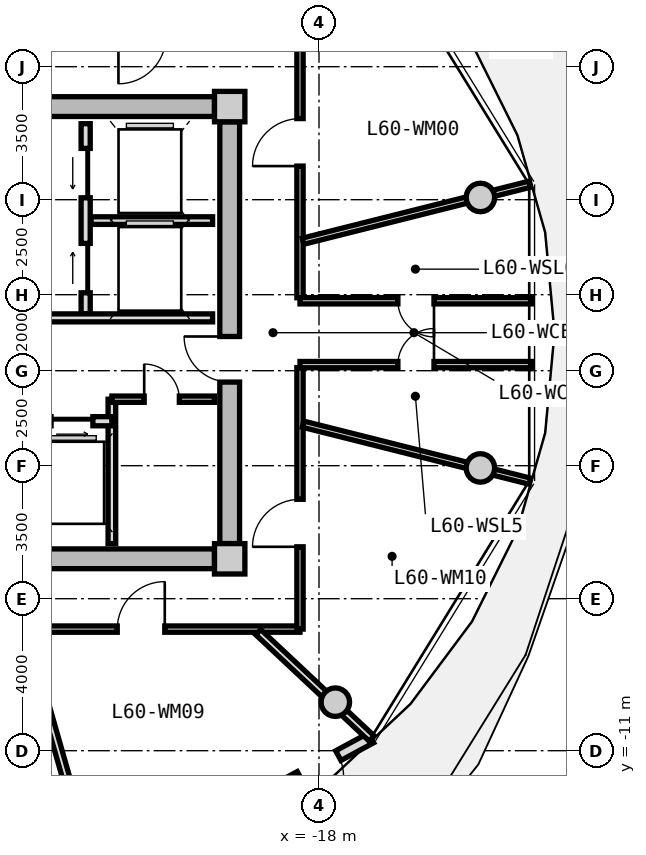
"""IFC4 building model, lengths in metres.
Left out: names, types, materials, properties, quantities, classifications, styles, units other than length and angle.
Written with IfcOpenShell. Run it as: python <this file> out.ifc"""

import sys

from ifc_helpers import new_model, si_unit, direction, frame, frame_2d, origin, origin_2d, place, context, subcontext, project, spatial, rectangle, circle, extrude, source, transform, mapped, element, fill, save


model = new_model("IFC4")
c1 = context("Model", 3, precision=1e-05, world=origin(), true_north=direction((0.0, 1.0)))
c2 = subcontext(c1, "Body", "Model", "MODEL_VIEW")
j1 = project(units=[si_unit("LENGTHUNIT", "METRE"), si_unit("PLANEANGLEUNIT", "RADIAN")], contexts=[c1])
p1 = place(None, origin())
s1 = spatial("IfcSite", under=j1, at=p1, CompositionType="ELEMENT")
p2 = place(p1, origin())
s2 = spatial("IfcBuilding", under=s1, at=p2, CompositionType="ELEMENT")
p3 = place(p2, frame((0.0, 0.0, 193.7)))
s3 = spatial("IfcBuildingStorey", under=s2, at=p3, CompositionType="ELEMENT", Elevation=193.7)
m1 = source(origin(), c2, "Body", "SweptSolid", [
    extrude(rectangle(XDim=0.8, YDim=0.8, at=origin_2d()), origin(), (0.0, 0.0, 1.0), 3.05),
])
for number, where, z_axis, x_axis in (
    (1, (-20.35, -5.95, 0.0), (0.0, 0.0, 1.0), (1.0, 0.0, 0.0)),
    (2, (-20.35, 5.95, 0.0), (0.0, 0.0, 1.0), (1.0, 0.0, 0.0)),
):
    element("IfcColumn", number, at=place(p3, frame(where, z_axis=z_axis, x_axis=x_axis)), inside=s3, PredefinedType="COLUMN", context=c2, shape_type="MappedRepresentation", body=[
        mapped(m1, transform((0.0, 0.0, 0.0), x_axis=(1.0, 0.0, 0.0), y_axis=(0.0, 1.0, 0.0), z_axis=(0.0, 0.0, 1.0), scale=1.0)),
    ])
m2 = source(origin(), c2, "Body", "SweptSolid", [
    extrude(rectangle(XDim=14.5, YDim=0.52, at=frame_2d((7.25, 0.0))), origin(), (0.0, 0.0, 1.0), 2.81),
])
for number, where, z_axis, x_axis in (
    (3, (-35.25, 5.95, 0.0), (0.0, 0.0, 1.0), (1.0, 0.0, 0.0)),
    (4, (-20.75, -5.95, 0.0), (0.0, 0.0, 1.0), (-1.0, 0.0, 0.0)),
):
    element("IfcWall", number, at=place(p3, frame(where, z_axis=z_axis, x_axis=x_axis)), inside=s3, PredefinedType="SHEAR", context=c2, shape_type="MappedRepresentation", body=[
        mapped(m2, transform((0.0, 0.0, 0.0), x_axis=(1.0, 0.0, 0.0), y_axis=(0.0, 1.0, 0.0), z_axis=(0.0, 0.0, 1.0), scale=1.0)),
    ])
m3 = source(origin(), c2, "Body", "SweptSolid", [
    extrude(rectangle(XDim=11.1, YDim=0.52, at=frame_2d((5.55, 0.0))), origin(), (0.0, 0.0, 1.0), 2.81),
])
p4 = place(p3, frame((-20.35, 5.55, 0.0), z_axis=(0.0, 0.0, 1.0), x_axis=(0.0, -1.0, 0.0)))
e5 = element("IfcWall", 5, at=p4, inside=s3, PredefinedType="SHEAR", context=c2, shape_type="MappedRepresentation", body=[
    mapped(m3, transform((0.0, 0.0, 0.0), x_axis=(1.0, 0.0, 0.0), y_axis=(0.0, 1.0, 0.0), z_axis=(0.0, 0.0, 1.0), scale=1.0)),
])
p5 = place(p4, frame((5.65, 0.0, 0.0)))
e6 = element("IfcOpeningElement", 6, at=p5, cuts=e5, PredefinedType="OPENING", context=c2, shape_type="SweptSolid", body=[
    extrude(rectangle(XDim=1.2, YDim=2.15, at=frame_2d((0.6, 1.075))), frame((0.0, 0.27, 0.0), z_axis=(0.0, -1.0, 0.0), x_axis=(1.0, 0.0, 0.0)), (0.0, 0.0, 1.0), 0.54),
])
m4 = source(origin(), c2, "Body", "SweptSolid", [
    extrude(circle(Radius=0.375, at=origin_2d()), origin(), (0.0, 0.0, 1.0), 3.05),
])
for number, where, z_axis, x_axis in (
    (7, (-13.753, 3.559, 0.0), (0.0, 0.0, 1.0), (1.0, 0.0, 0.0)),
    (8, (-17.57, -9.723, 0.0), (0.0, 0.0, 1.0), (1.0, 0.0, 0.0)),
    (9, (-13.753, -3.559, 0.0), (0.0, 0.0, 1.0), (1.0, 0.0, 0.0)),
):
    element("IfcColumn", number, at=place(p3, frame(where, z_axis=z_axis, x_axis=x_axis)), inside=s3, PredefinedType="COLUMN", context=c2, shape_type="MappedRepresentation", body=[
        mapped(m4, transform((0.0, 0.0, 0.0), x_axis=(1.0, 0.0, 0.0), y_axis=(0.0, 1.0, 0.0), z_axis=(0.0, 0.0, 1.0), scale=1.0)),
    ])
m5 = source(origin(), c2, "Body", "SweptSolid", [
    extrude(rectangle(XDim=8.197, YDim=0.29, at=frame_2d((4.099, 0.0))), origin(), (0.0, 0.0, 1.0), 2.81),
])
p6 = place(p3, frame((-16.63, -10.663, 0.0), z_axis=(0.0, 0.0, 1.0), x_axis=(-0.879369910001, -0.476139224791, 0.0)))
e10 = element("IfcWall", 10, at=p6, inside=s3, PredefinedType="SOLIDWALL", context=c2, shape_type="MappedRepresentation", body=[
    mapped(m5, transform((0.0, 0.0, 0.0), x_axis=(1.0, 0.0, 0.0), y_axis=(0.0, 1.0, 0.0), z_axis=(0.0, 0.0, 1.0), scale=1.0)),
])
p7 = place(p6, frame((0.98, 0.0, 0.0)))
e11 = element("IfcOpeningElement", 11, at=p7, cuts=e10, PredefinedType="OPENING", context=c2, shape_type="SweptSolid", body=[
    extrude(rectangle(XDim=1.15, YDim=2.25, at=frame_2d((0.575, 1.125))), frame((0.0, 0.155, 0.0), z_axis=(0.0, -1.0, 0.0), x_axis=(1.0, 0.0, 0.0)), (0.0, 0.0, 1.0), 0.31),
])
p8 = place(p6, frame((4.448, 0.0, 0.85)))
e12 = element("IfcOpeningElement", 12, at=p8, cuts=e10, PredefinedType="OPENING", context=c2, shape_type="SweptSolid", body=[
    extrude(rectangle(XDim=1.2, YDim=1.5, at=frame_2d((0.6, 0.75))), frame((0.0, 0.155, 0.0), z_axis=(0.0, -1.0, 0.0), x_axis=(1.0, 0.0, 0.0)), (0.0, 0.0, 1.0), 0.31),
])
m6 = source(origin(), c2, "Body", "SweptSolid", [
    extrude(rectangle(XDim=5.0, YDim=0.24, at=frame_2d((2.5, 0.0))), origin(), (0.0, 0.0, 1.0), 2.795),
])
p9 = place(p3, frame((-24.14, 0.5, 0.0), z_axis=(0.0, 0.0, 1.0), x_axis=(0.0, 1.0, 0.0)))
e13 = element("IfcWall", 13, at=p9, inside=s3, PredefinedType="PARTITIONING", context=c2, shape_type="MappedRepresentation", body=[
    mapped(m6, transform((0.0, 0.0, 0.0), x_axis=(1.0, 0.0, 0.0), y_axis=(0.0, 1.0, 0.0), z_axis=(0.0, 0.0, 1.0), scale=1.0)),
])
p10 = place(p9, frame((3.05, 0.0, 0.0)))
e14 = element("IfcOpeningElement", 14, at=p10, cuts=e13, PredefinedType="OPENING", context=c2, shape_type="SweptSolid", body=[
    extrude(rectangle(XDim=1.3, YDim=2.2, at=frame_2d((0.65, 1.1))), frame((0.0, 0.13, 0.0), z_axis=(0.0, -1.0, 0.0), x_axis=(1.0, 0.0, 0.0)), (0.0, 0.0, 1.0), 0.26),
])
p11 = place(p9, frame((0.55, 0.0, 0.0)))
e15 = element("IfcOpeningElement", 15, at=p11, cuts=e13, PredefinedType="OPENING", context=c2, shape_type="SweptSolid", body=[
    extrude(rectangle(XDim=1.3, YDim=2.2, at=frame_2d((0.65, 1.1))), frame((0.0, 0.13, 0.0), z_axis=(0.0, -1.0, 0.0), x_axis=(1.0, 0.0, 0.0)), (0.0, 0.0, 1.0), 0.26),
])
m7 = source(origin(), c2, "Body", "SweptSolid", [
    extrude(rectangle(XDim=3.2, YDim=0.2, at=frame_2d((1.6, 0.0))), origin(), (0.0, 0.0, 1.0), 2.795),
])
p12 = place(p3, frame((-24.0, 2.95, 0.0), z_axis=(0.0, 0.0, 1.0), x_axis=(1.0, 0.0, 0.0)))
e16 = element("IfcWall", 16, at=p12, inside=s3, PredefinedType="PARTITIONING", context=c2, shape_type="MappedRepresentation", body=[
    mapped(m7, transform((0.0, 0.0, 0.0), x_axis=(1.0, 0.0, 0.0), y_axis=(0.0, 1.0, 0.0), z_axis=(0.0, 0.0, 1.0), scale=1.0)),
])
m8 = source(origin(), c2, "Body", "SweptSolid", [
    extrude(rectangle(XDim=6.66, YDim=0.21, at=frame_2d((3.33, 0.0))), origin(), (0.0, 0.0, 1.0), 2.795),
])
p13 = place(p3, frame((-27.46, 0.39, 0.0), z_axis=(0.0, 0.0, 1.0), x_axis=(1.0, 0.0, 0.0)))
e17 = element("IfcWall", 17, at=p13, inside=s3, PredefinedType="PARTITIONING", context=c2, shape_type="MappedRepresentation", body=[
    mapped(m8, transform((0.0, 0.0, 0.0), x_axis=(1.0, 0.0, 0.0), y_axis=(0.0, 1.0, 0.0), z_axis=(0.0, 0.0, 1.0), scale=1.0)),
])
p14 = place(p13, frame((1.0, 0.0, 0.0)))
e18 = element("IfcOpeningElement", 18, at=p14, cuts=e17, PredefinedType="OPENING", context=c2, shape_type="SweptSolid", body=[
    extrude(rectangle(XDim=1.2, YDim=2.15, at=frame_2d((0.6, 1.075))), frame((0.0, 0.115, 0.0), z_axis=(0.0, -1.0, 0.0), x_axis=(1.0, 0.0, 0.0)), (0.0, 0.0, 1.0), 0.23),
])
m9 = source(origin(), c2, "Body", "SweptSolid", [
    extrude(rectangle(XDim=3.8, YDim=0.2, at=frame_2d((1.9, 0.0))), origin(), (0.0, 0.0, 1.0), 2.795),
])
p15 = place(p3, frame((-23.45, -5.55, 0.0), z_axis=(0.0, 0.0, 1.0), x_axis=(0.0, 1.0, 0.0)))
e19 = element("IfcWall", 19, at=p15, inside=s3, PredefinedType="PARTITIONING", context=c2, shape_type="MappedRepresentation", body=[
    mapped(m9, transform((0.0, 0.0, 0.0), x_axis=(1.0, 0.0, 0.0), y_axis=(0.0, 1.0, 0.0), z_axis=(0.0, 0.0, 1.0), scale=1.0)),
])
m10 = source(origin(), c2, "Body", "SweptSolid", [
    extrude(rectangle(XDim=2.05, YDim=0.24, at=frame_2d((1.025, 0.0))), origin(), (0.0, 0.0, 1.0), 2.795),
])
p16 = place(p3, frame((-25.5, -2.33, 0.0), z_axis=(0.0, 0.0, 1.0), x_axis=(1.0, 0.0, 0.0)))
e20 = element("IfcWall", 20, at=p16, inside=s3, PredefinedType="PARTITIONING", context=c2, shape_type="MappedRepresentation", body=[
    mapped(m10, transform((0.0, 0.0, 0.0), x_axis=(1.0, 0.0, 0.0), y_axis=(0.0, 1.0, 0.0), z_axis=(0.0, 0.0, 1.0), scale=1.0)),
])
p17 = place(p16, frame((0.45, 0.0, 0.0)))
e21 = element("IfcOpeningElement", 21, at=p17, cuts=e20, PredefinedType="OPENING", context=c2, shape_type="SweptSolid", body=[
    extrude(rectangle(XDim=1.1, YDim=2.2, at=frame_2d((0.55, 1.1))), frame((0.0, 0.13, 0.0), z_axis=(0.0, -1.0, 0.0), x_axis=(1.0, 0.0, 0.0)), (0.0, 0.0, 1.0), 0.26),
])
m11 = source(origin(), c2, "Body", "SweptSolid", [
    extrude(rectangle(XDim=2.7, YDim=0.165, at=frame_2d((1.35, 0.0))), origin(), (0.0, 0.0, 1.0), 2.795),
])
p18 = place(p3, frame((-23.45, -1.75, 0.0), z_axis=(0.0, 0.0, 1.0), x_axis=(1.0, 0.0, 0.0)))
e22 = element("IfcWall", 22, at=p18, inside=s3, PredefinedType="PARTITIONING", context=c2, shape_type="MappedRepresentation", body=[
    mapped(m11, transform((0.0, 0.0, 0.0), x_axis=(1.0, 0.0, 0.0), y_axis=(0.0, 1.0, 0.0), z_axis=(0.0, 0.0, 1.0), scale=1.0)),
])
p19 = place(p18, frame((0.85, 0.0, 0.0)))
e23 = element("IfcOpeningElement", 23, at=p19, cuts=e22, PredefinedType="OPENING", context=c2, shape_type="SweptSolid", body=[
    extrude(rectangle(XDim=0.925, YDim=2.1, at=frame_2d((0.462, 1.05))), frame((0.0, 0.093, 0.0), z_axis=(0.0, -1.0, 0.0), x_axis=(1.0, 0.0, 0.0)), (0.0, 0.0, 1.0), 0.185),
])
m12 = source(origin(), c2, "Body", "SweptSolid", [
    extrude(rectangle(XDim=19.0, YDim=0.165, at=frame_2d((9.5, 0.0))), origin(), (0.0, 0.0, 1.0), 2.795),
])
p20 = place(p3, frame((-18.5, -7.8, 0.0), z_axis=(0.0, 0.0, 1.0), x_axis=(-1.0, 0.0, 0.0)))
e24 = element("IfcWall", 24, at=p20, inside=s3, PredefinedType="PARTITIONING", context=c2, shape_type="MappedRepresentation", body=[
    mapped(m12, transform((0.0, 0.0, 0.0), x_axis=(1.0, 0.0, 0.0), y_axis=(0.0, 1.0, 0.0), z_axis=(0.0, 0.0, 1.0), scale=1.0)),
])
p21 = place(p20, frame((12.569, 0.0, 0.0)))
e25 = element("IfcOpeningElement", 25, at=p21, cuts=e24, PredefinedType="OPENING", context=c2, shape_type="SweptSolid", body=[
    extrude(rectangle(XDim=1.25, YDim=2.2, at=frame_2d((0.625, 1.1))), frame((0.0, 0.093, 0.0), z_axis=(0.0, -1.0, 0.0), x_axis=(1.0, 0.0, 0.0)), (0.0, 0.0, 1.0), 0.185),
])
p22 = place(p20, frame((7.868, 0.0, 0.0)))
e26 = element("IfcOpeningElement", 26, at=p22, cuts=e24, PredefinedType="OPENING", context=c2, shape_type="SweptSolid", body=[
    extrude(rectangle(XDim=1.25, YDim=2.2, at=frame_2d((0.625, 1.1))), frame((0.0, 0.093, 0.0), z_axis=(0.0, -1.0, 0.0), x_axis=(1.0, 0.0, 0.0)), (0.0, 0.0, 1.0), 0.185),
])
p23 = place(p20, frame((3.559, 0.0, 0.0)))
e27 = element("IfcOpeningElement", 27, at=p23, cuts=e24, PredefinedType="OPENING", context=c2, shape_type="SweptSolid", body=[
    extrude(rectangle(XDim=1.25, YDim=2.2, at=frame_2d((0.625, 1.1))), frame((0.0, 0.093, 0.0), z_axis=(0.0, -1.0, 0.0), x_axis=(1.0, 0.0, 0.0)), (0.0, 0.0, 1.0), 0.185),
])
m13 = source(origin(), c2, "Body", "SweptSolid", [
    extrude(rectangle(XDim=6.88, YDim=0.165, at=frame_2d((3.44, 0.0))), origin(), (0.0, 0.0, 1.0), 2.795),
])
p24 = place(p3, frame((-18.5, 7.8, 0.0), z_axis=(0.0, 0.0, 1.0), x_axis=(0.0, -1.0, 0.0)))
e28 = element("IfcWall", 28, at=p24, inside=s3, PredefinedType="PARTITIONING", context=c2, shape_type="MappedRepresentation", body=[
    mapped(m13, transform((0.0, 0.0, 0.0), x_axis=(1.0, 0.0, 0.0), y_axis=(0.0, 1.0, 0.0), z_axis=(0.0, 0.0, 1.0), scale=1.0)),
])
p25 = place(p24, frame((2.166, 0.0, 0.0)))
e29 = element("IfcOpeningElement", 29, at=p25, cuts=e28, PredefinedType="OPENING", context=c2, shape_type="SweptSolid", body=[
    extrude(rectangle(XDim=1.25, YDim=2.2, at=frame_2d((0.625, 1.1))), frame((0.0, 0.093, 0.0), z_axis=(0.0, -1.0, 0.0), x_axis=(1.0, 0.0, 0.0)), (0.0, 0.0, 1.0), 0.185),
])
p26 = place(p3, frame((-18.5, -0.92, 0.0), z_axis=(0.0, 0.0, 1.0), x_axis=(0.0, -1.0, 0.0)))
e30 = element("IfcWall", 30, at=p26, inside=s3, PredefinedType="PARTITIONING", context=c2, shape_type="MappedRepresentation", body=[
    mapped(m13, transform((0.0, 0.0, 0.0), x_axis=(1.0, 0.0, 0.0), y_axis=(0.0, 1.0, 0.0), z_axis=(0.0, 0.0, 1.0), scale=1.0)),
])
p27 = place(p26, frame((3.464, 0.0, 0.0)))
e31 = element("IfcOpeningElement", 31, at=p27, cuts=e30, PredefinedType="OPENING", context=c2, shape_type="SweptSolid", body=[
    extrude(rectangle(XDim=1.25, YDim=2.2, at=frame_2d((0.625, 1.1))), frame((0.0, 0.093, 0.0), z_axis=(0.0, -1.0, 0.0), x_axis=(1.0, 0.0, 0.0)), (0.0, 0.0, 1.0), 0.185),
])
m14 = source(origin(), c2, "Body", "SweptSolid", [
    extrude(rectangle(XDim=6.157, YDim=0.165, at=frame_2d((3.079, 0.0))), origin(), (0.0, 0.0, 1.0), 2.435),
])
p28 = place(p3, frame((-18.42, -2.407, 0.0), z_axis=(0.0, 0.0, 1.0), x_axis=(0.969840867184, -0.243738984038, 0.0)))
e32 = element("IfcWall", 32, at=p28, inside=s3, PredefinedType="PARTITIONING", context=c2, shape_type="MappedRepresentation", body=[
    mapped(m14, transform((0.0, 0.0, 0.0), x_axis=(1.0, 0.0, 0.0), y_axis=(0.0, 1.0, 0.0), z_axis=(0.0, 0.0, 1.0), scale=1.0)),
])
m15 = source(origin(), c2, "Body", "SweptSolid", [
    extrude(rectangle(XDim=6.157, YDim=0.165, at=frame_2d((3.079, 0.0))), origin(), (0.0, 0.0, 1.0), 2.395),
])
p29 = place(p3, frame((-18.42, 2.407, 0.0), z_axis=(0.0, 0.0, 1.0), x_axis=(0.969840867184, 0.243738984038, 0.0)))
e33 = element("IfcWall", 33, at=p29, inside=s3, PredefinedType="PARTITIONING", context=c2, shape_type="MappedRepresentation", body=[
    mapped(m15, transform((0.0, 0.0, 0.0), x_axis=(1.0, 0.0, 0.0), y_axis=(0.0, 1.0, 0.0), z_axis=(0.0, 0.0, 1.0), scale=1.0)),
])
m16 = source(origin(), c2, "Body", "SweptSolid", [
    extrude(rectangle(XDim=6.101, YDim=0.165, at=frame_2d((3.051, 0.0))), origin(), (0.0, 0.0, 1.0), 2.795),
])
p30 = place(p3, frame((-18.5, 0.84, 0.0), z_axis=(0.0, 0.0, 1.0), x_axis=(1.0, 0.0, 0.0)))
e34 = element("IfcWall", 34, at=p30, inside=s3, PredefinedType="PARTITIONING", context=c2, shape_type="MappedRepresentation", body=[
    mapped(m16, transform((0.0, 0.0, 0.0), x_axis=(1.0, 0.0, 0.0), y_axis=(0.0, 1.0, 0.0), z_axis=(0.0, 0.0, 1.0), scale=1.0)),
])
p31 = place(p30, frame((2.576, 0.0, 0.0)))
e35 = element("IfcOpeningElement", 35, at=p31, cuts=e34, PredefinedType="OPENING", context=c2, shape_type="SweptSolid", body=[
    extrude(rectangle(XDim=0.95, YDim=2.1, at=frame_2d((0.475, 1.05))), frame((0.0, 0.093, 0.0), z_axis=(0.0, -1.0, 0.0), x_axis=(1.0, 0.0, 0.0)), (0.0, 0.0, 1.0), 0.185),
])
p32 = place(p3, frame((-12.399, -0.84, 0.0), z_axis=(0.0, 0.0, 1.0), x_axis=(-1.0, 0.0, 0.0)))
e36 = element("IfcWall", 36, at=p32, inside=s3, PredefinedType="PARTITIONING", context=c2, shape_type="MappedRepresentation", body=[
    mapped(m16, transform((0.0, 0.0, 0.0), x_axis=(1.0, 0.0, 0.0), y_axis=(0.0, 1.0, 0.0), z_axis=(0.0, 0.0, 1.0), scale=1.0)),
])
p33 = place(p32, frame((2.576, 0.0, 0.0)))
e37 = element("IfcOpeningElement", 37, at=p33, cuts=e36, PredefinedType="OPENING", context=c2, shape_type="SweptSolid", body=[
    extrude(rectangle(XDim=0.95, YDim=2.1, at=frame_2d((0.475, 1.05))), frame((0.0, 0.093, 0.0), z_axis=(0.0, -1.0, 0.0), x_axis=(1.0, 0.0, 0.0)), (0.0, 0.0, 1.0), 0.185),
])
m17 = source(origin(), c2, "Body", "SweptSolid", [
    extrude(rectangle(XDim=6.974, YDim=0.19, at=frame_2d((3.487, 0.0))), origin(), (0.0, 0.0, 1.0), 2.395),
])
p34 = place(p3, frame((-25.749, -7.88, 0.0), z_axis=(0.0, 0.0, 1.0), x_axis=(0.274707256801, -0.961527910703, 0.0)))
e38 = element("IfcWall", 38, at=p34, inside=s3, PredefinedType="PARTITIONING", context=c2, shape_type="MappedRepresentation", body=[
    mapped(m17, transform((0.0, 0.0, 0.0), x_axis=(1.0, 0.0, 0.0), y_axis=(0.0, 1.0, 0.0), z_axis=(0.0, 0.0, 1.0), scale=1.0)),
])
m18 = source(origin(), c2, "Body", "SweptSolid", [
    extrude(rectangle(XDim=4.089, YDim=0.19, at=frame_2d((2.044, 0.0))), origin(), (0.0, 0.0, 1.0), 2.395),
])
p35 = place(p3, frame((-19.598, -7.88, 0.0), z_axis=(0.0, 0.0, 1.0), x_axis=(0.729401273609, -0.684086092577, 0.0)))
e39 = element("IfcWall", 39, at=p35, inside=s3, PredefinedType="PARTITIONING", context=c2, shape_type="MappedRepresentation", body=[
    mapped(m18, transform((0.0, 0.0, 0.0), x_axis=(1.0, 0.0, 0.0), y_axis=(0.0, 1.0, 0.0), z_axis=(0.0, 0.0, 1.0), scale=1.0)),
])
m19 = source(origin(), c2, "Body", "SweptSolid", [
    extrude(rectangle(XDim=1.15, YDim=2.25, at=frame_2d((0.575, 1.125))), frame((0.0, 0.025, 0.0), z_axis=(0.0, -1.0, 0.0), x_axis=(1.0, 0.0, 0.0)), (0.0, 0.0, 1.0), 0.05),
])
p36 = place(p7, origin())
e40 = element("IfcDoor", 40, at=p36, inside=s3, OperationType="SINGLE_SWING_RIGHT", PredefinedType="DOOR", context=c2, shape_type="MappedRepresentation", body=[
    mapped(m19, transform((0.0, 0.0, 0.0), x_axis=(1.0, 0.0, 0.0), y_axis=(0.0, 1.0, 0.0), z_axis=(0.0, 0.0, 1.0), scale=1.0)),
])
fill(e11, e40)
m20 = source(origin(), c2, "Body", "SweptSolid", [
    extrude(rectangle(XDim=1.3, YDim=2.2, at=frame_2d((0.65, 1.1))), frame((0.0, 0.025, 0.0), z_axis=(0.0, -1.0, 0.0), x_axis=(1.0, 0.0, 0.0)), (0.0, 0.0, 1.0), 0.05),
])
p37 = place(p10, origin())
e41 = element("IfcDoor", 41, at=p37, inside=s3, OperationType="SLIDING_TO_LEFT", PredefinedType="DOOR", context=c2, shape_type="MappedRepresentation", body=[
    mapped(m20, transform((0.0, 0.0, 0.0), x_axis=(1.0, 0.0, 0.0), y_axis=(0.0, 1.0, 0.0), z_axis=(0.0, 0.0, 1.0), scale=1.0)),
])
fill(e14, e41)
p38 = place(p11, origin())
e42 = element("IfcDoor", 42, at=p38, inside=s3, OperationType="SLIDING_TO_RIGHT", PredefinedType="DOOR", context=c2, shape_type="MappedRepresentation", body=[
    mapped(m20, transform((0.0, 0.0, 0.0), x_axis=(1.0, 0.0, 0.0), y_axis=(0.0, 1.0, 0.0), z_axis=(0.0, 0.0, 1.0), scale=1.0)),
])
fill(e15, e42)
m21 = source(origin(), c2, "Body", "SweptSolid", [
    extrude(rectangle(XDim=1.2, YDim=2.15, at=frame_2d((0.6, 1.075))), frame((0.0, 0.025, 0.0), z_axis=(0.0, -1.0, 0.0), x_axis=(1.0, 0.0, 0.0)), (0.0, 0.0, 1.0), 0.05),
])
p39 = place(p5, frame((1.2, 0.0, 0.0), z_axis=(0.0, 0.0, 1.0), x_axis=(-1.0, 0.0, 0.0)))
e43 = element("IfcDoor", 43, at=p39, inside=s3, OperationType="SINGLE_SWING_RIGHT", PredefinedType="DOOR", context=c2, shape_type="MappedRepresentation", body=[
    mapped(m21, transform((0.0, 0.0, 0.0), x_axis=(1.0, 0.0, 0.0), y_axis=(0.0, 1.0, 0.0), z_axis=(0.0, 0.0, 1.0), scale=1.0)),
])
fill(e6, e43)
m22 = source(origin(), c2, "Body", "SweptSolid", [
    extrude(rectangle(XDim=1.1, YDim=2.2, at=frame_2d((0.55, 1.1))), frame((0.0, 0.025, 0.0), z_axis=(0.0, -1.0, 0.0), x_axis=(1.0, 0.0, 0.0)), (0.0, 0.0, 1.0), 0.05),
])
p40 = place(p17, frame((1.1, 0.0, 0.0), z_axis=(0.0, 0.0, 1.0), x_axis=(-1.0, 0.0, 0.0)))
e44 = element("IfcDoor", 44, at=p40, inside=s3, OperationType="SLIDING_TO_RIGHT", PredefinedType="DOOR", context=c2, shape_type="MappedRepresentation", body=[
    mapped(m22, transform((0.0, 0.0, 0.0), x_axis=(1.0, 0.0, 0.0), y_axis=(0.0, 1.0, 0.0), z_axis=(0.0, 0.0, 1.0), scale=1.0)),
])
fill(e21, e44)
m23 = source(origin(), c2, "Body", "SweptSolid", [
    extrude(rectangle(XDim=0.925, YDim=2.1, at=frame_2d((0.462, 1.05))), frame((0.0, 0.025, 0.0), z_axis=(0.0, -1.0, 0.0), x_axis=(1.0, 0.0, 0.0)), (0.0, 0.0, 1.0), 0.05),
])
p41 = place(p19, origin())
e45 = element("IfcDoor", 45, at=p41, inside=s3, OperationType="SINGLE_SWING_LEFT", PredefinedType="DOOR", context=c2, shape_type="MappedRepresentation", body=[
    mapped(m23, transform((0.0, 0.0, 0.0), x_axis=(1.0, 0.0, 0.0), y_axis=(0.0, 1.0, 0.0), z_axis=(0.0, 0.0, 1.0), scale=1.0)),
])
fill(e23, e45)
m24 = source(origin(), c2, "Body", "SweptSolid", [
    extrude(rectangle(XDim=0.95, YDim=2.1, at=frame_2d((0.475, 1.05))), frame((0.0, 0.025, 0.0), z_axis=(0.0, -1.0, 0.0), x_axis=(1.0, 0.0, 0.0)), (0.0, 0.0, 1.0), 0.05),
])
p42 = place(p33, frame((0.95, 0.0, 0.0), z_axis=(0.0, 0.0, 1.0), x_axis=(-1.0, 0.0, 0.0)))
e46 = element("IfcDoor", 46, at=p42, inside=s3, OperationType="SINGLE_SWING_RIGHT", PredefinedType="DOOR", context=c2, shape_type="MappedRepresentation", body=[
    mapped(m24, transform((0.0, 0.0, 0.0), x_axis=(1.0, 0.0, 0.0), y_axis=(0.0, 1.0, 0.0), z_axis=(0.0, 0.0, 1.0), scale=1.0)),
])
fill(e37, e46)
p43 = place(p31, frame((0.95, 0.0, 0.0), z_axis=(0.0, 0.0, 1.0), x_axis=(-1.0, 0.0, 0.0)))
e47 = element("IfcDoor", 47, at=p43, inside=s3, OperationType="SINGLE_SWING_LEFT", PredefinedType="DOOR", context=c2, shape_type="MappedRepresentation", body=[
    mapped(m24, transform((0.0, 0.0, 0.0), x_axis=(1.0, 0.0, 0.0), y_axis=(0.0, 1.0, 0.0), z_axis=(0.0, 0.0, 1.0), scale=1.0)),
])
fill(e35, e47)
m25 = source(origin(), c2, "Body", "SweptSolid", [
    extrude(rectangle(XDim=1.25, YDim=2.2, at=frame_2d((0.625, 1.1))), frame((0.0, 0.025, 0.0), z_axis=(0.0, -1.0, 0.0), x_axis=(1.0, 0.0, 0.0)), (0.0, 0.0, 1.0), 0.05),
])
p44 = place(p25, frame((1.25, 0.0, 0.0), z_axis=(0.0, 0.0, 1.0), x_axis=(-1.0, 0.0, 0.0)))
e48 = element("IfcDoor", 48, at=p44, inside=s3, OperationType="SINGLE_SWING_LEFT", PredefinedType="DOOR", context=c2, shape_type="MappedRepresentation", body=[
    mapped(m25, transform((0.0, 0.0, 0.0), x_axis=(1.0, 0.0, 0.0), y_axis=(0.0, 1.0, 0.0), z_axis=(0.0, 0.0, 1.0), scale=1.0)),
])
fill(e29, e48)
p45 = place(p23, frame((1.25, 0.0, 0.0), z_axis=(0.0, 0.0, 1.0), x_axis=(-1.0, 0.0, 0.0)))
e49 = element("IfcDoor", 49, at=p45, inside=s3, OperationType="SINGLE_SWING_RIGHT", PredefinedType="DOOR", context=c2, shape_type="MappedRepresentation", body=[
    mapped(m25, transform((0.0, 0.0, 0.0), x_axis=(1.0, 0.0, 0.0), y_axis=(0.0, 1.0, 0.0), z_axis=(0.0, 0.0, 1.0), scale=1.0)),
])
fill(e27, e49)
p46 = place(p27, frame((1.25, 0.0, 0.0), z_axis=(0.0, 0.0, 1.0), x_axis=(-1.0, 0.0, 0.0)))
e50 = element("IfcDoor", 50, at=p46, inside=s3, OperationType="SINGLE_SWING_LEFT", PredefinedType="DOOR", context=c2, shape_type="MappedRepresentation", body=[
    mapped(m25, transform((0.0, 0.0, 0.0), x_axis=(1.0, 0.0, 0.0), y_axis=(0.0, 1.0, 0.0), z_axis=(0.0, 0.0, 1.0), scale=1.0)),
])
fill(e31, e50)
save(model, sys.argv[1])
